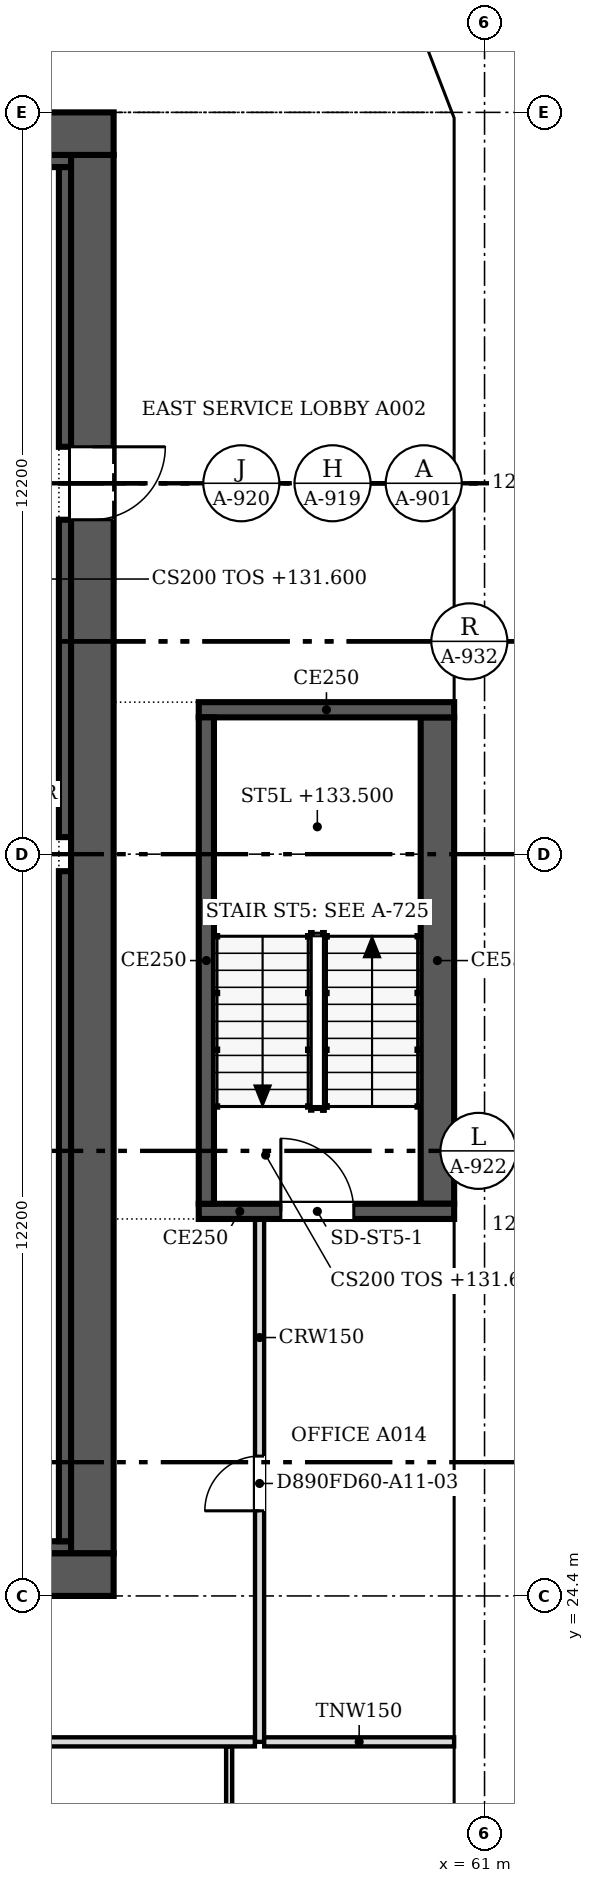
"""IFC4 building model, lengths in metres.
Left out: names, types, materials, properties, quantities, classifications, styles, units other than length and angle.
Written with IfcOpenShell. Run it as: python <this file> out.ifc"""

import sys

from ifc_helpers import new_model, si_unit, direction, frame, frame_2d, origin, place, context, subcontext, project, spatial, polyline, rectangle, outline, extrude, faceted_brep, source, transform, mapped, element, fill, save


model = new_model("IFC4")
c1 = context("Model", 3, precision=1e-05, world=origin(), true_north=direction((0.0, 1.0)))
c2 = subcontext(c1, "Body", "Model", "MODEL_VIEW")
j1 = project(units=[si_unit("LENGTHUNIT", "METRE"), si_unit("PLANEANGLEUNIT", "RADIAN")], contexts=[c1])
p1 = place(None, origin())
s1 = spatial("IfcSite", under=j1, at=p1, CompositionType="ELEMENT")
p2 = place(p1, origin())
s2 = spatial("IfcBuilding", under=s1, at=p2, CompositionType="ELEMENT")
p3 = place(p2, frame((0.0, 0.0, 131.6)))
s3 = spatial("IfcBuildingStorey", under=s2, at=p3, CompositionType="ELEMENT", Elevation=131.6)
m1 = source(origin(), c2, "Body", "SweptSolid", [
    extrude(outline(polyline([(3.05, 0.0), (6.1, 3.8), (3.05, 7.6), (0.0, 3.8), (3.05, 0.0)])), frame((0.0, 0.25, 0.0), z_axis=(0.0, -1.0, 0.0), x_axis=(1.0, 0.0, 0.0)), (0.0, 0.0, 1.0), 0.5),
])
p4 = place(p3, frame((60.75, 15.25, -3.8), z_axis=(0.0, 0.0, 1.0), x_axis=(0.0, 1.0, 0.0)))
e1 = element("IfcWall", 1, at=p4, inside=s3, PredefinedType="SOLIDWALL", context=c2, shape_type="MappedRepresentation", body=[
    mapped(m1, transform((0.0, 0.0, 0.0), scale=1.0)),
])
m2 = source(origin(), c2, "Body", "SweptSolid", [
    extrude(outline(polyline([(3.05, 0.399), (5.78, 3.8), (3.05, 7.2), (0.321, 3.8), (3.05, 0.399)])), frame((0.0, 0.26, 0.0), z_axis=(0.0, -1.0, 0.0), x_axis=(1.0, 0.0, 0.0)), (0.0, 0.0, 1.0), 0.52),
])
p5 = place(p4, origin())
e2 = element("IfcOpeningElement", 2, at=p5, cuts=e1, PredefinedType="OPENING", context=c2, shape_type="MappedRepresentation", body=[
    mapped(m2, transform((0.0, 0.0, 0.0), scale=1.0)),
])
m3 = source(origin(), c2, "Body", "Brep", [
    faceted_brep([(3.05, -0.25, 0.0), (6.1, -0.25, 3.8), (6.1, -0.25, 3.8), (3.05, -0.25, 7.6), (0.0, -0.25, 3.8), (0.0, 0.25, 3.8), (3.05, 0.25, 7.6), (6.1, 0.25, 3.8), (6.1, 0.25, 3.8), (3.05, 0.25, 0.0)], [[[0, 1, 2, 3, 4]], [[5, 6, 7, 8, 9]], [[9, 8, 1, 0]], [[7, 6, 3, 2]], [[6, 5, 4, 3]], [[5, 9, 0, 4]], [[1, 8, 7, 2]]]),
])
p6 = place(p3, frame((60.75, 21.35, -3.8), z_axis=(0.0, 0.0, 1.0), x_axis=(0.0, 1.0, 0.0)))
e3 = element("IfcWall", 3, at=p6, inside=s3, PredefinedType="SOLIDWALL", context=c2, shape_type="MappedRepresentation", body=[
    mapped(m3, transform((0.0, 0.0, 0.0), scale=1.0)),
])
p7 = place(p6, origin())
e4 = element("IfcOpeningElement", 4, at=p7, cuts=e3, PredefinedType="OPENING", context=c2, shape_type="MappedRepresentation", body=[
    mapped(m2, transform((0.0, 0.0, 0.0), scale=1.0)),
])
p8 = place(p3, frame((60.75, 27.45, -3.8), z_axis=(0.0, 0.0, 1.0), x_axis=(0.0, 1.0, 0.0)))
e5 = element("IfcWall", 5, at=p8, inside=s3, PredefinedType="SOLIDWALL", context=c2, shape_type="MappedRepresentation", body=[
    mapped(m1, transform((0.0, 0.0, 0.0), scale=1.0)),
])
p9 = place(p8, origin())
e6 = element("IfcOpeningElement", 6, at=p9, cuts=e5, PredefinedType="OPENING", context=c2, shape_type="MappedRepresentation", body=[
    mapped(m2, transform((0.0, 0.0, 0.0), scale=1.0)),
])
p10 = place(p3, frame((60.75, 33.55, -3.8), z_axis=(0.0, 0.0, 1.0), x_axis=(0.0, 1.0, 0.0)))
e7 = element("IfcWall", 7, at=p10, inside=s3, PredefinedType="SOLIDWALL", context=c2, shape_type="MappedRepresentation", body=[
    mapped(m3, transform((0.0, 0.0, 0.0), scale=1.0)),
])
p11 = place(p10, origin())
e8 = element("IfcOpeningElement", 8, at=p11, cuts=e7, PredefinedType="OPENING", context=c2, shape_type="MappedRepresentation", body=[
    mapped(m2, transform((0.0, 0.0, 0.0), scale=1.0)),
])
p12 = place(p3, frame((60.75, 39.65, -3.8), z_axis=(0.0, 0.0, 1.0), x_axis=(0.0, 1.0, 0.0)))
e9 = element("IfcWall", 9, at=p12, inside=s3, PredefinedType="SOLIDWALL", context=c2, shape_type="MappedRepresentation", body=[
    mapped(m1, transform((0.0, 0.0, 0.0), scale=1.0)),
])
p13 = place(p12, origin())
e10 = element("IfcOpeningElement", 10, at=p13, cuts=e9, PredefinedType="OPENING", context=c2, shape_type="MappedRepresentation", body=[
    mapped(m2, transform((0.0, 0.0, 0.0), scale=1.0)),
])
m4 = source(origin(), c2, "Body", "Brep", [
    faceted_brep([(3.003, -0.25, 0.0), (3.05, -0.25, 0.06), (3.05, -0.25, 7.54), (3.003, -0.25, 7.6), (0.0, -0.25, 3.8), (0.0, 0.25, 3.8), (2.957, 0.25, 7.541), (2.957, 0.25, 0.059), (3.003, 0.0, 0.0), (3.003, 0.0, 7.6)], [[[0, 1, 2, 3, 4]], [[5, 6, 7]], [[1, 0, 8]], [[9, 3, 2]], [[6, 5, 4, 3, 9]], [[5, 7, 8, 0, 4]], [[1, 8, 7, 6, 9, 2]]]),
])
p14 = place(p3, frame((60.75, 45.75, -3.8), z_axis=(0.0, 0.0, 1.0), x_axis=(0.0, 1.0, 0.0)))
e11 = element("IfcWall", 11, at=p14, inside=s3, PredefinedType="SOLIDWALL", context=c2, shape_type="MappedRepresentation", body=[
    mapped(m4, transform((0.0, 0.0, 0.0), scale=1.0)),
])
m5 = source(origin(), c2, "Body", "SweptSolid", [
    extrude(outline(polyline([(2.803, 6.944), (0.319, 3.8), (2.803, 0.656), (2.803, 6.944)])), frame((0.0, 0.26, 0.0), z_axis=(0.0, -1.0, 0.0), x_axis=(1.0, 0.0, 0.0)), (0.0, 0.0, 1.0), 0.52),
])
p15 = place(p14, origin())
e12 = element("IfcOpeningElement", 12, at=p15, cuts=e11, PredefinedType="OPENING", context=c2, shape_type="MappedRepresentation", body=[
    mapped(m5, transform((0.0, 0.0, 0.0), scale=1.0)),
])
m6 = source(origin(), c2, "Body", "Brep", [
    faceted_brep([(0.047, -0.25, 0.0), (2.997, -0.25, 3.8), (0.047, -0.25, 7.6), (0.0, -0.25, 7.541), (0.0, -0.25, 0.059), (0.093, 0.25, 7.54), (2.944, 0.25, 3.868), (2.944, 0.25, 3.732), (0.093, 0.25, 0.06), (2.997, 0.0, 3.8), (0.047, 0.0, 0.0), (0.047, 0.0, 7.6)], [[[0, 1, 2, 3, 4]], [[5, 6, 7, 8]], [[8, 7, 9, 1, 0, 10]], [[6, 5, 11, 2, 1, 9]], [[3, 2, 11]], [[10, 0, 4]], [[8, 10, 4, 3, 11, 5]], [[7, 6, 9]]]),
])
p16 = place(p3, frame((60.767, 48.71, -3.8), z_axis=(0.0, 0.0, 1.0), x_axis=(-0.359901446078, 0.932990326376, 0.0)))
e13 = element("IfcWall", 13, at=p16, inside=s3, PredefinedType="SOLIDWALL", context=c2, shape_type="MappedRepresentation", body=[
    mapped(m6, transform((0.0, 0.0, 0.0), scale=1.0)),
])
m7 = source(origin(), c2, "Body", "SweptSolid", [
    extrude(outline(polyline([(0.247, 0.665), (2.681, 3.8), (0.247, 6.935), (0.247, 0.665)])), frame((0.0, 0.26, 0.0), z_axis=(0.0, -1.0, 0.0), x_axis=(1.0, 0.0, 0.0)), (0.0, 0.0, 1.0), 0.52),
])
p17 = place(p16, origin())
e14 = element("IfcOpeningElement", 14, at=p17, cuts=e13, PredefinedType="OPENING", context=c2, shape_type="MappedRepresentation", body=[
    mapped(m7, transform((0.0, 0.0, 0.0), scale=1.0)),
])
p18 = place(p2, frame((0.0, 0.0, 135.4)))
s4 = spatial("IfcBuildingStorey", under=s2, at=p18, CompositionType="ELEMENT", Elevation=135.4)
m8 = source(origin(), c2, "Body", "Brep", [
    faceted_brep([(3.05, -0.25, 0.0), (6.1, -0.25, 3.8), (6.1, -0.25, 3.8), (3.05, -0.25, 7.6), (0.0, -0.25, 3.8), (0.0, 0.25, 3.8), (3.05, 0.25, 7.6), (6.1, 0.25, 3.8), (6.1, 0.25, 3.8), (3.05, 0.25, 0.0)], [[[0, 1, 2, 3, 4]], [[5, 6, 7, 8, 9]], [[9, 8, 1, 0]], [[7, 6, 3, 2]], [[6, 5, 4, 3]], [[5, 9, 0, 4]], [[1, 8, 7, 2]]]),
])
p19 = place(p18, frame((60.75, 18.3, -3.8), z_axis=(0.0, 0.0, 1.0), x_axis=(0.0, 1.0, 0.0)))
e15 = element("IfcWall", 15, at=p19, inside=s4, PredefinedType="SOLIDWALL", context=c2, shape_type="MappedRepresentation", body=[
    mapped(m8, transform((0.0, 0.0, 0.0), scale=1.0)),
])
m9 = source(origin(), c2, "Body", "SweptSolid", [
    extrude(outline(polyline([(3.05, 0.399), (5.78, 3.8), (3.05, 7.2), (0.321, 3.8), (3.05, 0.399)])), frame((0.0, 0.26, 0.0), z_axis=(0.0, -1.0, 0.0), x_axis=(1.0, 0.0, 0.0)), (0.0, 0.0, 1.0), 0.52),
])
p20 = place(p19, origin())
e16 = element("IfcOpeningElement", 16, at=p20, cuts=e15, PredefinedType="OPENING", context=c2, shape_type="MappedRepresentation", body=[
    mapped(m9, transform((0.0, 0.0, 0.0), scale=1.0)),
])
m10 = source(origin(), c2, "Body", "SweptSolid", [
    extrude(outline(polyline([(3.05, 0.0), (6.1, 3.8), (3.05, 7.6), (0.0, 3.8), (3.05, 0.0)])), frame((0.0, 0.25, 0.0), z_axis=(0.0, -1.0, 0.0), x_axis=(1.0, 0.0, 0.0)), (0.0, 0.0, 1.0), 0.5),
])
p21 = place(p18, frame((60.75, 24.4, -3.8), z_axis=(0.0, 0.0, 1.0), x_axis=(0.0, 1.0, 0.0)))
e17 = element("IfcWall", 17, at=p21, inside=s4, PredefinedType="SOLIDWALL", context=c2, shape_type="MappedRepresentation", body=[
    mapped(m10, transform((0.0, 0.0, 0.0), scale=1.0)),
])
p22 = place(p21, origin())
e18 = element("IfcOpeningElement", 18, at=p22, cuts=e17, PredefinedType="OPENING", context=c2, shape_type="MappedRepresentation", body=[
    mapped(m9, transform((0.0, 0.0, 0.0), scale=1.0)),
])
p23 = place(p18, frame((60.75, 30.5, -3.8), z_axis=(0.0, 0.0, 1.0), x_axis=(0.0, 1.0, 0.0)))
e19 = element("IfcWall", 19, at=p23, inside=s4, PredefinedType="SOLIDWALL", context=c2, shape_type="MappedRepresentation", body=[
    mapped(m10, transform((0.0, 0.0, 0.0), scale=1.0)),
])
p24 = place(p23, origin())
e20 = element("IfcOpeningElement", 20, at=p24, cuts=e19, PredefinedType="OPENING", context=c2, shape_type="MappedRepresentation", body=[
    mapped(m9, transform((0.0, 0.0, 0.0), scale=1.0)),
])
p25 = place(p18, frame((60.75, 36.6, -3.8), z_axis=(0.0, 0.0, 1.0), x_axis=(0.0, 1.0, 0.0)))
e21 = element("IfcWall", 21, at=p25, inside=s4, PredefinedType="SOLIDWALL", context=c2, shape_type="MappedRepresentation", body=[
    mapped(m8, transform((0.0, 0.0, 0.0), scale=1.0)),
])
p26 = place(p25, origin())
e22 = element("IfcOpeningElement", 22, at=p26, cuts=e21, PredefinedType="OPENING", context=c2, shape_type="MappedRepresentation", body=[
    mapped(m9, transform((0.0, 0.0, 0.0), scale=1.0)),
])
m11 = source(origin(), c2, "Body", "Brep", [
    faceted_brep([(3.05, -0.25, 0.0), (6.053, -0.25, 3.8), (3.05, -0.25, 7.6), (0.0, -0.25, 3.8), (0.0, 0.25, 3.8), (3.05, 0.25, 7.6), (6.007, 0.25, 3.859), (6.007, 0.25, 3.741), (3.05, 0.25, 0.0), (6.053, 0.0, 3.8)], [[[0, 1, 2, 3]], [[4, 5, 6, 7, 8]], [[8, 7, 9, 1, 0]], [[6, 5, 2, 1, 9]], [[5, 4, 3, 2]], [[4, 8, 0, 3]], [[9, 7, 6]]]),
])
p27 = place(p18, frame((60.75, 42.7, -3.8), z_axis=(0.0, 0.0, 1.0), x_axis=(0.0, 1.0, 0.0)))
e23 = element("IfcWall", 23, at=p27, inside=s4, PredefinedType="SOLIDWALL", context=c2, shape_type="MappedRepresentation", body=[
    mapped(m11, transform((0.0, 0.0, 0.0), scale=1.0)),
])
m12 = source(origin(), c2, "Body", "SweptSolid", [
    extrude(outline(polyline([(3.049, 0.401), (5.735, 3.8), (3.049, 7.199), (0.321, 3.8), (3.049, 0.401)])), frame((0.0, 0.26, 0.0), z_axis=(0.0, -1.0, 0.0), x_axis=(1.0, 0.0, 0.0)), (0.0, 0.0, 1.0), 0.52),
])
p28 = place(p27, origin())
e24 = element("IfcOpeningElement", 24, at=p28, cuts=e23, PredefinedType="OPENING", context=c2, shape_type="MappedRepresentation", body=[
    mapped(m12, transform((0.0, 0.0, 0.0), scale=1.0)),
])
m13 = source(origin(), c2, "Body", "Brep", [
    faceted_brep([(2.95, -0.25, 0.0), (3.003, -0.25, 0.068), (3.003, -0.25, 7.531), (2.95, -0.25, 7.6), (0.0, -0.25, 3.8), (0.047, 0.25, 3.86), (2.898, 0.25, 7.532), (2.898, 0.25, 0.068), (0.047, 0.25, 3.74), (2.95, 0.0, 0.0), (2.95, 0.0, 7.6), (0.0, 0.0, 3.8)], [[[0, 1, 2, 3, 4]], [[5, 6, 7, 8]], [[1, 0, 9]], [[10, 3, 2]], [[6, 5, 11, 4, 3, 10]], [[8, 7, 9, 0, 4, 11]], [[8, 11, 5]], [[1, 9, 7, 6, 10, 2]]]),
])
p29 = place(p18, frame((60.75, 48.753, -3.8), z_axis=(0.0, 0.0, 1.0), x_axis=(-0.35992665181, 0.932980602862, 0.0)))
e25 = element("IfcWall", 25, at=p29, inside=s4, PredefinedType="SOLIDWALL", context=c2, shape_type="MappedRepresentation", body=[
    mapped(m13, transform((0.0, 0.0, 0.0), scale=1.0)),
])
m14 = source(origin(), c2, "Body", "SweptSolid", [
    extrude(outline(polyline([(2.75, 6.935), (0.316, 3.8), (2.75, 0.665), (2.75, 6.935)])), frame((0.0, 0.26, 0.0), z_axis=(0.0, -1.0, 0.0), x_axis=(1.0, 0.0, 0.0)), (0.0, 0.0, 1.0), 0.52),
])
p30 = place(p29, origin())
e26 = element("IfcOpeningElement", 26, at=p30, cuts=e25, PredefinedType="OPENING", context=c2, shape_type="MappedRepresentation", body=[
    mapped(m14, transform((0.0, 0.0, 0.0), scale=1.0)),
])
p31 = place(p3, frame((54.9, 24.75, 0.0), z_axis=(0.0, 0.0, 1.0), x_axis=(-1.0, 0.0, 0.0)))
e27 = element("IfcWall", 27, at=p31, inside=s3, PredefinedType="SHEAR", context=c2, shape_type="SweptSolid", body=[
    extrude(rectangle(XDim=24.4, YDim=0.7, at=frame_2d((12.2, 0.0))), origin(), (0.0, 0.0, 1.0), 3.8),
])
m15 = source(origin(), c2, "Body", "SweptSolid", [
    extrude(rectangle(XDim=1.2, YDim=2.1, at=frame_2d((0.6, 1.05))), frame((0.0, 0.36, 0.0), z_axis=(0.0, -1.0, 0.0), x_axis=(1.0, 0.0, 0.0)), (0.0, 0.0, 1.0), 0.72),
])
p32 = place(p31, frame((1.5, 0.0, 0.0)))
e28 = element("IfcOpeningElement", 28, at=p32, cuts=e27, PredefinedType="OPENING", context=c2, shape_type="MappedRepresentation", body=[
    mapped(m15, transform((0.0, 0.0, 0.0), scale=1.0)),
])
p33 = place(p3, frame((30.5, 48.45, 0.0), z_axis=(0.0, 0.0, 1.0), x_axis=(1.0, 0.0, 0.0)))
e29 = element("IfcWall", 29, at=p33, inside=s3, PredefinedType="SHEAR", context=c2, shape_type="SweptSolid", body=[
    extrude(rectangle(XDim=24.4, YDim=0.7, at=frame_2d((12.2, 0.0))), origin(), (0.0, 0.0, 1.0), 3.8),
])
p34 = place(p3, frame((54.55, 48.1, 0.0), z_axis=(0.0, 0.0, 1.0), x_axis=(0.0, -1.0, 0.0)))
e30 = element("IfcWall", 30, at=p34, inside=s3, PredefinedType="SHEAR", context=c2, shape_type="SweptSolid", body=[
    extrude(rectangle(XDim=23.0, YDim=0.7, at=frame_2d((11.5, 0.0))), origin(), (0.0, 0.0, 1.0), 3.8),
])
p35 = place(p34, frame((4.8, 0.0, 0.0)))
e31 = element("IfcOpeningElement", 31, at=p35, cuts=e30, PredefinedType="OPENING", context=c2, shape_type="MappedRepresentation", body=[
    mapped(m15, transform((0.0, 0.0, 0.0), scale=1.0)),
])
p36 = place(p3, frame((53.4, 25.2, 0.0), z_axis=(0.0, 0.0, 1.0), x_axis=(1.0, 0.0, 0.0)))
e32 = element("IfcWall", 32, at=p36, inside=s3, PredefinedType="SOLIDWALL", context=c2, shape_type="SweptSolid", body=[
    extrude(rectangle(XDim=0.8, YDim=0.2, at=frame_2d((0.4, 0.0))), origin(), (0.0, 0.0, 1.0), 3.8),
])
p37 = place(p3, frame((31.2, 48.0, 0.0), z_axis=(0.0, 0.0, 1.0), x_axis=(1.0, 0.0, 0.0)))
e33 = element("IfcWall", 33, at=p37, inside=s3, PredefinedType="SOLIDWALL", context=c2, shape_type="SweptSolid", body=[
    extrude(rectangle(XDim=23.0, YDim=0.2, at=frame_2d((11.5, 0.0))), origin(), (0.0, 0.0, 1.0), 3.8),
])
p38 = place(p3, frame((54.1, 25.3, 0.0), z_axis=(0.0, 0.0, 1.0), x_axis=(0.0, 1.0, 0.0)))
e34 = element("IfcWall", 34, at=p38, inside=s3, PredefinedType="SOLIDWALL", context=c2, shape_type="SweptSolid", body=[
    extrude(rectangle(XDim=11.02, YDim=0.2, at=frame_2d((5.51, 0.0))), origin(), (0.0, 0.0, 1.0), 3.8),
])
p39 = place(p3, frame((54.1, 36.88, 0.0), z_axis=(0.0, 0.0, 1.0), x_axis=(0.0, 1.0, 0.0)))
e35 = element("IfcWall", 35, at=p39, inside=s3, PredefinedType="SOLIDWALL", context=c2, shape_type="SweptSolid", body=[
    extrude(rectangle(XDim=5.22, YDim=0.2, at=frame_2d((2.61, 0.0))), origin(), (0.0, 0.0, 1.0), 3.8),
])
p40 = place(p3, frame((54.1, 43.3, 0.0), z_axis=(0.0, 0.0, 1.0), x_axis=(0.0, 1.0, 0.0)))
e36 = element("IfcWall", 36, at=p40, inside=s3, PredefinedType="SOLIDWALL", context=c2, shape_type="SweptSolid", body=[
    extrude(rectangle(XDim=4.6, YDim=0.2, at=frame_2d((2.3, 0.0))), origin(), (0.0, 0.0, 1.0), 3.8),
])
p41 = place(p3, frame((60.5, 30.725, 0.0), z_axis=(0.0, 0.0, 1.0), x_axis=(-1.0, 0.0, 0.0)))
e37 = element("IfcWall", 37, at=p41, inside=s3, PredefinedType="SOLIDWALL", context=c2, shape_type="SweptSolid", body=[
    extrude(rectangle(XDim=4.2, YDim=0.25, at=frame_2d((2.1, 0.0))), origin(), (0.0, 0.0, 1.0), 3.8),
])
m16 = source(origin(), c2, "Body", "SweptSolid", [
    extrude(rectangle(XDim=1.2, YDim=2.1, at=frame_2d((0.6, 1.05))), frame((0.0, 0.135, 0.0), z_axis=(0.0, -1.0, 0.0), x_axis=(1.0, 0.0, 0.0)), (0.0, 0.0, 1.0), 0.27),
])
p42 = place(p41, frame((1.65, 0.0, 0.0)))
e38 = element("IfcOpeningElement", 38, at=p42, cuts=e37, PredefinedType="OPENING", context=c2, shape_type="MappedRepresentation", body=[
    mapped(m16, transform((0.0, 0.0, 0.0), scale=1.0)),
])
p43 = place(p3, frame((56.425, 30.85, 0.0), z_axis=(0.0, 0.0, 1.0), x_axis=(0.0, 1.0, 0.0)))
e39 = element("IfcWall", 39, at=p43, inside=s3, PredefinedType="SOLIDWALL", context=c2, shape_type="SweptSolid", body=[
    extrude(rectangle(XDim=8.0, YDim=0.25, at=frame_2d((4.0, 0.0))), origin(), (0.0, 0.0, 1.0), 3.8),
])
p44 = place(p3, frame((56.3, 38.975, 0.0), z_axis=(0.0, 0.0, 1.0), x_axis=(1.0, 0.0, 0.0)))
e40 = element("IfcWall", 40, at=p44, inside=s3, PredefinedType="SOLIDWALL", context=c2, shape_type="SweptSolid", body=[
    extrude(rectangle(XDim=4.2, YDim=0.25, at=frame_2d((2.1, 0.0))), origin(), (0.0, 0.0, 1.0), 3.8),
])
p45 = place(p3, frame((60.225, 38.85, 0.0), z_axis=(0.0, 0.0, 1.0), x_axis=(0.0, -1.0, 0.0)))
e41 = element("IfcWall", 41, at=p45, inside=s3, PredefinedType="SOLIDWALL", context=c2, shape_type="SweptSolid", body=[
    extrude(rectangle(XDim=8.0, YDim=0.55, at=frame_2d((4.0, 0.0))), origin(), (0.0, 0.0, 1.0), 3.8),
])
p46 = place(p3, frame((56.8, 21.924, 0.0), z_axis=(0.0, 0.0, 1.0), x_axis=(0.0, -1.0, 0.0)))
e42 = element("IfcWall", 42, at=p46, inside=s3, PredefinedType="PARTITIONING", context=c2, shape_type="SweptSolid", body=[
    extrude(rectangle(XDim=7.748, YDim=0.1, at=frame_2d((3.874, 0.0))), origin(), (0.0, 0.0, 1.0), 3.067),
])
m17 = source(origin(), c2, "Body", "SweptSolid", [
    extrude(rectangle(XDim=0.9, YDim=2.1, at=frame_2d((0.45, 1.05))), frame((0.0, 0.06, 0.0), z_axis=(0.0, -1.0, 0.0), x_axis=(1.0, 0.0, 0.0)), (0.0, 0.0, 1.0), 0.12),
])
p47 = place(p46, frame((3.448, 0.0, 0.0)))
e43 = element("IfcOpeningElement", 43, at=p47, cuts=e42, PredefinedType="OPENING", context=c2, shape_type="MappedRepresentation", body=[
    mapped(m17, transform((0.0, 0.0, 0.0), scale=1.0)),
])
p48 = place(p3, frame((45.476, 22.0, 0.0), z_axis=(0.0, 0.0, 1.0), x_axis=(1.0, 0.0, 0.0)))
e44 = element("IfcWall", 44, at=p48, inside=s3, PredefinedType="PARTITIONING", context=c2, shape_type="SweptSolid", body=[
    extrude(rectangle(XDim=11.748, YDim=0.15, at=frame_2d((5.874, 0.0))), origin(), (0.0, 0.0, 1.0), 3.067),
])
p49 = place(p3, frame((57.3, 30.6, 0.0), z_axis=(0.0, 0.0, 1.0), x_axis=(0.0, -1.0, 0.0)))
e45 = element("IfcWall", 45, at=p49, inside=s3, PredefinedType="PARTITIONING", context=c2, shape_type="SweptSolid", body=[
    extrude(rectangle(XDim=8.6, YDim=0.15, at=frame_2d((4.3, 0.0))), origin(), (0.0, 0.0, 1.0), 3.067),
])
m18 = source(origin(), c2, "Body", "SweptSolid", [
    extrude(rectangle(XDim=0.9, YDim=2.1, at=frame_2d((0.45, 1.05))), frame((0.0, 0.085, 0.0), z_axis=(0.0, -1.0, 0.0), x_axis=(1.0, 0.0, 0.0)), (0.0, 0.0, 1.0), 0.17),
])
p50 = place(p49, frame((3.9, 0.0, 0.0)))
e46 = element("IfcOpeningElement", 46, at=p50, cuts=e45, PredefinedType="OPENING", context=c2, shape_type="MappedRepresentation", body=[
    mapped(m18, transform((0.0, 0.0, 0.0), scale=1.0)),
])
p51 = place(p3, frame((57.376, 22.0, 0.0), z_axis=(0.0, 0.0, 1.0), x_axis=(1.0, 0.0, 0.0)))
e47 = element("IfcWall", 47, at=p51, inside=s3, PredefinedType="PARTITIONING", context=c2, shape_type="SweptSolid", body=[
    extrude(rectangle(XDim=3.124, YDim=0.15, at=frame_2d((1.562, 0.0))), origin(), (0.0, 0.0, 1.0), 3.067),
])
m19 = source(origin(), c2, "Body", "SweptSolid", [
    extrude(rectangle(XDim=1.2, YDim=2.1, at=frame_2d((0.6, 1.05))), frame((0.0, 0.025, 0.0), z_axis=(0.0, -1.0, 0.0), x_axis=(1.0, 0.0, 0.0)), (0.0, 0.0, 1.0), 0.05),
])
p52 = place(p35, origin())
e48 = element("IfcDoor", 48, at=p52, inside=s3, OperationType="SINGLE_SWING_LEFT", PredefinedType="DOOR", context=c2, shape_type="MappedRepresentation", body=[
    mapped(m19, transform((0.0, 0.0, 0.0), scale=1.0)),
])
fill(e31, e48)
p53 = place(p42, origin())
e49 = element("IfcDoor", 49, at=p53, inside=s3, OperationType="SINGLE_SWING_RIGHT", PredefinedType="DOOR", context=c2, shape_type="MappedRepresentation", body=[
    mapped(m19, transform((0.0, 0.0, 0.0), scale=1.0)),
])
fill(e38, e49)
m20 = source(origin(), c2, "Body", "SweptSolid", [
    extrude(rectangle(XDim=0.9, YDim=2.1, at=frame_2d((0.45, 1.05))), frame((0.0, 0.025, 0.0), z_axis=(0.0, -1.0, 0.0), x_axis=(1.0, 0.0, 0.0)), (0.0, 0.0, 1.0), 0.05),
])
p54 = place(p50, origin())
e50 = element("IfcDoor", 50, at=p54, inside=s3, OperationType="SINGLE_SWING_RIGHT", PredefinedType="DOOR", context=c2, shape_type="MappedRepresentation", body=[
    mapped(m20, transform((0.0, 0.0, 0.0), scale=1.0)),
])
fill(e46, e50)
save(model, sys.argv[1])
